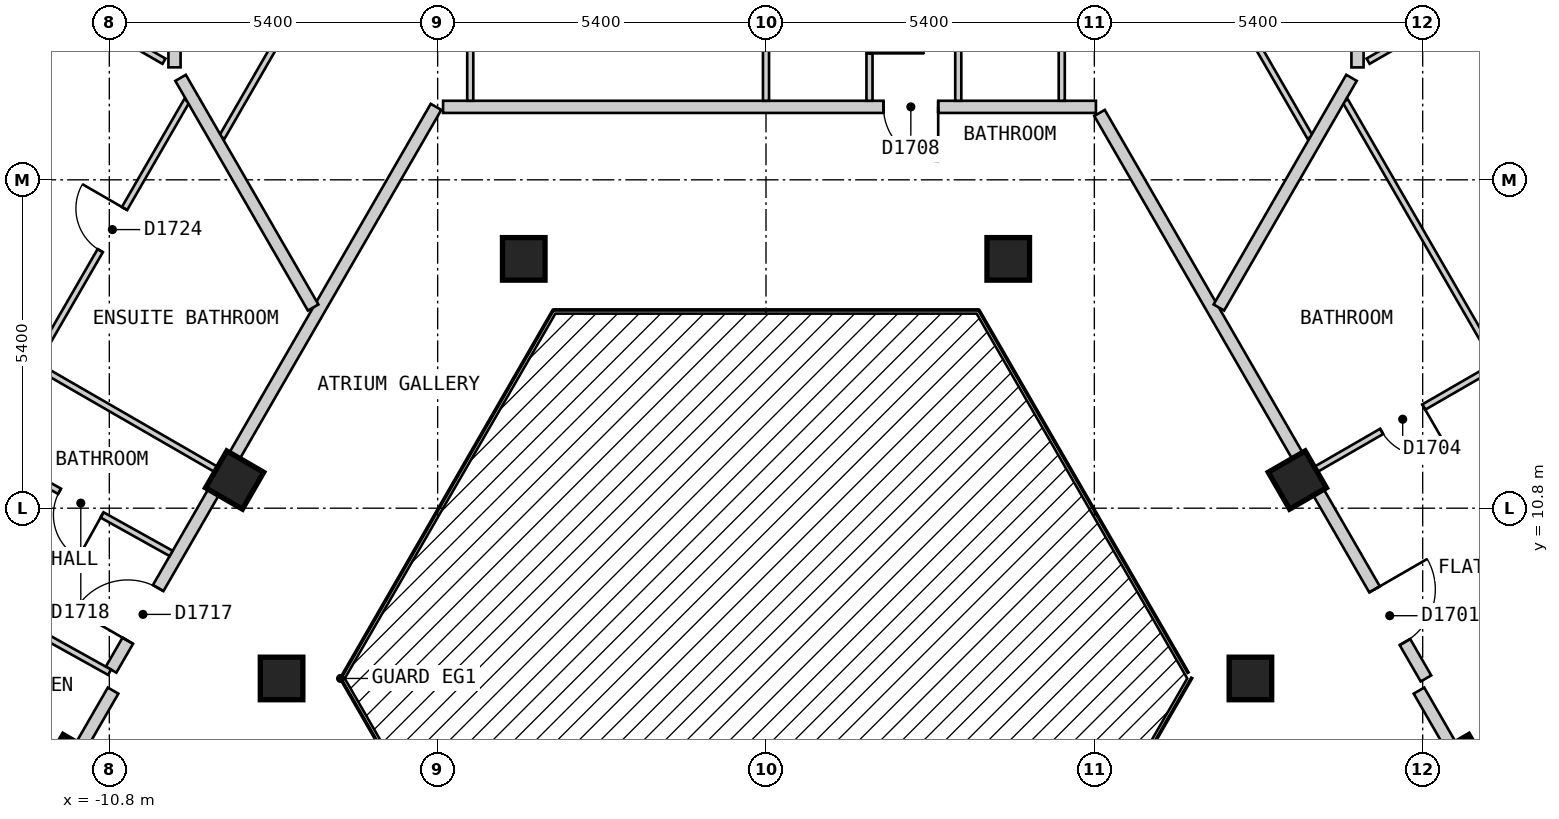
"""IFC4 building model, lengths in metres.
Left out: names, types, materials, properties, quantities, classifications, styles, units other than length and angle.
Written with IfcOpenShell. Run it as: python <this file> out.ifc"""

import sys

from ifc_helpers import new_model, si_unit, direction, frame, frame_2d, origin, origin_2d, place, context, subcontext, project, spatial, rectangle, extrude, element, fill, save


model = new_model("IFC4")
c1 = context("Model", 3, precision=1e-05, world=origin(), true_north=direction((0.0, 1.0)))
c2 = subcontext(c1, "Body", "Model", "MODEL_VIEW")
j1 = project(units=[si_unit("LENGTHUNIT", "METRE"), si_unit("PLANEANGLEUNIT", "RADIAN")], contexts=[c1])
p1 = place(None, origin())
s1 = spatial("IfcSite", under=j1, at=p1, CompositionType="ELEMENT")
p2 = place(p1, origin())
s2 = spatial("IfcBuilding", under=s1, at=p2, CompositionType="ELEMENT")
p3 = place(p2, frame((0.0, 0.0, 181.2)))
s3 = spatial("IfcBuildingStorey", under=s2, at=p3, CompositionType="ELEMENT", Elevation=181.2)
for number, where, z_axis, x_axis in (
    (1, (11.431, 6.6, 0.0), (0.0, 0.0, 1.0), (-0.5, 0.866, 0.0)),
    (2, (7.967, 8.0, 0.0), (0.0, 0.0, 1.0), (1.0, 0.0, 0.0)),
    (3, (8.739, 11.263, 0.0), (0.0, 0.0, 1.0), (-0.5, 0.866, 0.0)),
    (4, (3.984, 14.9, 0.0), (0.0, 0.0, 1.0), (1.0, 0.0, 0.0)),
    (5, (-3.984, 14.9, 0.0), (0.0, 0.0, 1.0), (1.0, 0.0, 0.0)),
    (6, (-8.739, 11.263, 0.0), (0.0, 0.0, 1.0), (-0.5, -0.866, 0.0)),
    (7, (-7.967, 8.0, 0.0), (0.0, 0.0, 1.0), (1.0, 0.0, 0.0)),
    (8, (-11.431, 6.6, 0.0), (0.0, 0.0, 1.0), (-0.5, -0.866, 0.0)),
):
    element("IfcColumn", number, at=place(p3, frame(where, z_axis=z_axis, x_axis=x_axis)), inside=s3, PredefinedType="COLUMN", context=c2, shape_type="SweptSolid", body=[
        extrude(rectangle(XDim=0.7, YDim=0.7, at=origin_2d()), origin(), (0.0, 0.0, 1.0), 3.0),
    ])
p4 = place(p3, frame((10.739, 7.8, 0.0), z_axis=(0.0, 0.0, 1.0), x_axis=(0.500023726918, -0.866011704609, 0.0)))
e9 = element("IfcWall", 9, at=p4, inside=s3, PredefinedType="PARTITIONING", context=c2, shape_type="SweptSolid", body=[
    extrude(rectangle(XDim=9.47, YDim=0.2, at=frame_2d((4.735, 0.0))), origin(), (0.0, 0.0, 1.0), 2.7),
])
p5 = place(p4, frame((8.168, 0.0, 0.0)))
e10 = element("IfcOpeningElement", 10, at=p5, cuts=e9, PredefinedType="OPENING", context=c2, shape_type="SweptSolid", body=[
    extrude(rectangle(XDim=1.0, YDim=2.1, at=frame_2d((0.5, 1.05))), frame((0.0, 0.11, 0.0), z_axis=(0.0, -1.0, 0.0), x_axis=(1.0, 0.0, 0.0)), (0.0, 0.0, 1.0), 0.22),
])
p6 = place(p3, frame((5.485, 17.3, 0.0), z_axis=(0.0, 0.0, 1.0), x_axis=(0.499965832213, -0.866045129667, 0.0)))
e11 = element("IfcWall", 11, at=p6, inside=s3, PredefinedType="PARTITIONING", context=c2, shape_type="SweptSolid", body=[
    extrude(rectangle(XDim=10.739, YDim=0.2, at=frame_2d((5.369, 0.0))), origin(), (0.0, 0.0, 1.0), 2.7),
])
p7 = place(p6, frame((9.047, 0.0, 0.0)))
e12 = element("IfcOpeningElement", 12, at=p7, cuts=e11, PredefinedType="OPENING", context=c2, shape_type="SweptSolid", body=[
    extrude(rectangle(XDim=1.0, YDim=2.1, at=frame_2d((0.5, 1.05))), frame((0.0, 0.11, 0.0), z_axis=(0.0, -1.0, 0.0), x_axis=(1.0, 0.0, 0.0)), (0.0, 0.0, 1.0), 0.22),
])
p8 = place(p3, frame((-5.311, 17.4, 0.0), z_axis=(0.0, 0.0, 1.0), x_axis=(1.0, 0.0, 0.0)))
e13 = element("IfcWall", 13, at=p8, inside=s3, PredefinedType="PARTITIONING", context=c2, shape_type="SweptSolid", body=[
    extrude(rectangle(XDim=10.737, YDim=0.2, at=frame_2d((5.369, 0.0))), origin(), (0.0, 0.0, 1.0), 2.7),
])
p9 = place(p8, frame((7.243, 0.0, 0.0)))
e14 = element("IfcOpeningElement", 14, at=p9, cuts=e13, PredefinedType="OPENING", context=c2, shape_type="SweptSolid", body=[
    extrude(rectangle(XDim=0.9, YDim=2.1, at=frame_2d((0.45, 1.05))), frame((0.0, 0.11, 0.0), z_axis=(0.0, -1.0, 0.0), x_axis=(1.0, 0.0, 0.0)), (0.0, 0.0, 1.0), 0.22),
])
p10 = place(p3, frame((-15.53, -0.501, 0.0), z_axis=(0.0, 0.0, 1.0), x_axis=(0.499952498232, 0.866052827206, 0.0)))
e15 = element("IfcWall", 15, at=p10, inside=s3, PredefinedType="PARTITIONING", context=c2, shape_type="SweptSolid", body=[
    extrude(rectangle(XDim=9.585, YDim=0.2, at=frame_2d((4.792, 0.0))), origin(), (0.0, 0.0, 1.0), 2.7),
])
p11 = place(p10, frame((0.525, 0.0, 0.0)))
e16 = element("IfcOpeningElement", 16, at=p11, cuts=e15, PredefinedType="OPENING", context=c2, shape_type="SweptSolid", body=[
    extrude(rectangle(XDim=1.0, YDim=2.1, at=frame_2d((0.5, 1.05))), frame((0.0, 0.11, 0.0), z_axis=(0.0, -1.0, 0.0), x_axis=(1.0, 0.0, 0.0)), (0.0, 0.0, 1.0), 0.22),
])
p12 = place(p3, frame((-10.771, 8.145, 0.0), z_axis=(0.0, 0.0, 1.0), x_axis=(0.500048075867, 0.865997645391, 0.0)))
e17 = element("IfcWall", 17, at=p12, inside=s3, PredefinedType="PARTITIONING", context=c2, shape_type="SweptSolid", body=[
    extrude(rectangle(XDim=10.687, YDim=0.2, at=frame_2d((5.344, 0.0))), origin(), (0.0, 0.0, 1.0), 2.7),
])
p13 = place(p12, frame((0.549, 0.0, 0.0)))
e18 = element("IfcOpeningElement", 18, at=p13, cuts=e17, PredefinedType="OPENING", context=c2, shape_type="SweptSolid", body=[
    extrude(rectangle(XDim=1.0, YDim=2.1, at=frame_2d((0.5, 1.05))), frame((0.0, 0.11, 0.0), z_axis=(0.0, -1.0, 0.0), x_axis=(1.0, 0.0, 0.0)), (0.0, 0.0, 1.0), 0.22),
])
p14 = place(p3, frame((7.073, 20.15, 0.0), z_axis=(0.0, 0.0, 1.0), x_axis=(0.499917691695, -0.866072919292, 0.0)))
e19 = element("IfcWall", 19, at=p14, inside=s3, PredefinedType="PARTITIONING", context=c2, shape_type="SweptSolid", body=[
    extrude(rectangle(XDim=3.753, YDim=0.1, at=frame_2d((1.876, 0.0))), origin(), (0.0, 0.0, 1.0), 2.7),
])
p15 = place(p14, frame((0.96, 0.0, 0.0)))
e20 = element("IfcOpeningElement", 20, at=p15, cuts=e19, PredefinedType="OPENING", context=c2, shape_type="SweptSolid", body=[
    extrude(rectangle(XDim=0.8, YDim=2.1, at=frame_2d((0.4, 1.05))), frame((0.0, 0.06, 0.0), z_axis=(0.0, -1.0, 0.0), x_axis=(1.0, 0.0, 0.0)), (0.0, 0.0, 1.0), 0.12),
])
p16 = place(p3, frame((9.526, 17.5, 0.0), z_axis=(0.0, 0.0, 1.0), x_axis=(0.500019134094, -0.866014356428, 0.0)))
e21 = element("IfcWall", 21, at=p16, inside=s3, PredefinedType="PARTITIONING", context=c2, shape_type="SweptSolid", body=[
    extrude(rectangle(XDim=10.97, YDim=0.1, at=frame_2d((5.485, 0.0))), origin(), (0.0, 0.0, 1.0), 2.7),
])
p17 = place(p16, frame((7.25, 0.0, 0.0)))
e22 = element("IfcOpeningElement", 22, at=p17, cuts=e21, PredefinedType="OPENING", context=c2, shape_type="SweptSolid", body=[
    extrude(rectangle(XDim=0.9, YDim=2.1, at=frame_2d((0.45, 1.05))), frame((0.0, 0.06, 0.0), z_axis=(0.0, -1.0, 0.0), x_axis=(1.0, 0.0, 0.0)), (0.0, 0.0, 1.0), 0.12),
])
p18 = place(p3, frame((0.0, 20.17, 0.0), z_axis=(0.0, 0.0, 1.0), x_axis=(0.0, -1.0, 0.0)))
e23 = element("IfcWall", 23, at=p18, inside=s3, PredefinedType="PARTITIONING", context=c2, shape_type="SweptSolid", body=[
    extrude(rectangle(XDim=2.67, YDim=0.1, at=frame_2d((1.335, 0.0))), origin(), (0.0, 0.0, 1.0), 2.7),
])
p19 = place(p3, frame((4.864, 20.03, 0.0), z_axis=(0.0, 0.0, 1.0), x_axis=(0.0, -1.0, 0.0)))
e24 = element("IfcWall", 24, at=p19, inside=s3, PredefinedType="PARTITIONING", context=c2, shape_type="SweptSolid", body=[
    extrude(rectangle(XDim=2.53, YDim=0.1, at=frame_2d((1.265, 0.0))), origin(), (0.0, 0.0, 1.0), 2.7),
])
p20 = place(p3, frame((-12.798, 11.735, 0.0), z_axis=(0.0, 0.0, 1.0), x_axis=(0.873649600774, -0.486555623816, 0.0)))
e25 = element("IfcWall", 25, at=p20, inside=s3, PredefinedType="PARTITIONING", context=c2, shape_type="SweptSolid", body=[
    extrude(rectangle(XDim=3.451, YDim=0.1, at=frame_2d((1.726, 0.0))), origin(), (0.0, 0.0, 1.0), 2.7),
])
p21 = place(p20, frame((1.35, 0.0, 0.0)))
e26 = element("IfcOpeningElement", 26, at=p21, cuts=e25, PredefinedType="OPENING", context=c2, shape_type="SweptSolid", body=[
    extrude(rectangle(XDim=0.8, YDim=2.1, at=frame_2d((0.4, 1.05))), frame((0.0, 0.06, 0.0), z_axis=(0.0, -1.0, 0.0), x_axis=(1.0, 0.0, 0.0)), (0.0, 0.0, 1.0), 0.12),
])
p22 = place(p3, frame((-13.898, 9.829, 0.0), z_axis=(0.0, 0.0, 1.0), x_axis=(0.873715787747, -0.486436760784, 0.0)))
e27 = element("IfcWall", 27, at=p22, inside=s3, PredefinedType="PARTITIONING", context=c2, shape_type="SweptSolid", body=[
    extrude(rectangle(XDim=3.55, YDim=0.1, at=frame_2d((1.775, 0.0))), origin(), (0.0, 0.0, 1.0), 2.7),
])
p23 = place(p22, frame((1.3, 0.0, 0.0)))
e28 = element("IfcOpeningElement", 28, at=p23, cuts=e27, PredefinedType="OPENING", context=c2, shape_type="SweptSolid", body=[
    extrude(rectangle(XDim=0.9, YDim=2.1, at=frame_2d((0.45, 1.05))), frame((0.0, 0.06, 0.0), z_axis=(0.0, -1.0, 0.0), x_axis=(1.0, 0.0, 0.0)), (0.0, 0.0, 1.0), 0.12),
])
p24 = place(p3, frame((-14.679, 8.475, 0.0), z_axis=(0.0, 0.0, 1.0), x_axis=(0.865995104784, -0.500052475737, 0.0)))
e29 = element("IfcWall", 29, at=p24, inside=s3, PredefinedType="PARTITIONING", context=c2, shape_type="SweptSolid", body=[
    extrude(rectangle(XDim=3.65, YDim=0.1, at=frame_2d((1.825, 0.0))), origin(), (0.0, 0.0, 1.0), 2.7),
])
p25 = place(p3, frame((-14.794, 20.975, 0.0), z_axis=(0.0, 0.0, 1.0), x_axis=(0.866011447264, -0.500024172624, 0.0)))
e30 = element("IfcWall", 30, at=p25, inside=s3, PredefinedType="PARTITIONING", context=c2, shape_type="SweptSolid", body=[
    extrude(rectangle(XDim=5.65, YDim=0.1, at=frame_2d((2.825, 0.0))), origin(), (0.0, 0.0, 1.0), 2.7),
])
p26 = place(p25, frame((2.475, 0.0, 0.0)))
e31 = element("IfcOpeningElement", 31, at=p26, cuts=e30, PredefinedType="OPENING", context=c2, shape_type="SweptSolid", body=[
    extrude(rectangle(XDim=0.9, YDim=2.1, at=frame_2d((0.45, 1.05))), frame((0.0, 0.06, 0.0), z_axis=(0.0, -1.0, 0.0), x_axis=(1.0, 0.0, 0.0)), (0.0, 0.0, 1.0), 0.12),
])
p27 = place(p3, frame((-8.949, 16.9, 0.0), z_axis=(0.0, 0.0, 1.0), x_axis=(0.499949850951, 0.866054355415, 0.0)))
e32 = element("IfcWall", 32, at=p27, inside=s3, PredefinedType="PARTITIONING", context=c2, shape_type="SweptSolid", body=[
    extrude(rectangle(XDim=3.811, YDim=0.1, at=frame_2d((1.905, 0.0))), origin(), (0.0, 0.0, 1.0), 2.7),
])
p28 = place(p27, frame((1.992, 0.0, 0.0)))
e33 = element("IfcOpeningElement", 33, at=p28, cuts=e32, PredefinedType="OPENING", context=c2, shape_type="SweptSolid", body=[
    extrude(rectangle(XDim=0.8, YDim=2.1, at=frame_2d((0.4, 1.05))), frame((0.0, 0.06, 0.0), z_axis=(0.0, -1.0, 0.0), x_axis=(1.0, 0.0, 0.0)), (0.0, 0.0, 1.0), 0.12),
])
p29 = place(p3, frame((-15.012, 8.0, 0.0), z_axis=(0.0, 0.0, 1.0), x_axis=(0.500047346826, 0.865998066356, 0.0)))
e34 = element("IfcWall", 34, at=p29, inside=s3, PredefinedType="PARTITIONING", context=c2, shape_type="SweptSolid", body=[
    extrude(rectangle(XDim=10.971, YDim=0.1, at=frame_2d((5.486, 0.0))), origin(), (0.0, 0.0, 1.0), 2.7),
])
p30 = place(p29, frame((2.791, 0.0, 0.0)))
e35 = element("IfcOpeningElement", 35, at=p30, cuts=e34, PredefinedType="OPENING", context=c2, shape_type="SweptSolid", body=[
    extrude(rectangle(XDim=0.9, YDim=2.1, at=frame_2d((0.45, 1.05))), frame((0.0, 0.06, 0.0), z_axis=(0.0, -1.0, 0.0), x_axis=(1.0, 0.0, 0.0)), (0.0, 0.0, 1.0), 0.12),
])
p31 = place(p29, frame((8.124, 0.0, 0.0)))
e36 = element("IfcOpeningElement", 36, at=p31, cuts=e34, PredefinedType="OPENING", context=c2, shape_type="SweptSolid", body=[
    extrude(rectangle(XDim=0.8, YDim=2.1, at=frame_2d((0.4, 1.05))), frame((0.0, 0.06, 0.0), z_axis=(0.0, -1.0, 0.0), x_axis=(1.0, 0.0, 0.0)), (0.0, 0.0, 1.0), 0.12),
])
p32 = place(p3, frame((3.162, 17.5, 0.0), z_axis=(0.0, 0.0, 1.0), x_axis=(0.0, 1.0, 0.0)))
e37 = element("IfcWall", 37, at=p32, inside=s3, PredefinedType="PARTITIONING", context=c2, shape_type="SweptSolid", body=[
    extrude(rectangle(XDim=2.51, YDim=0.1, at=frame_2d((1.255, 0.0))), origin(), (0.0, 0.0, 1.0), 2.7),
])
p33 = place(p32, frame((0.83, 0.0, 0.0)))
e38 = element("IfcOpeningElement", 38, at=p33, cuts=e37, PredefinedType="OPENING", context=c2, shape_type="SweptSolid", body=[
    extrude(rectangle(XDim=0.8, YDim=2.1, at=frame_2d((0.4, 1.05))), frame((0.0, 0.06, 0.0), z_axis=(0.0, -1.0, 0.0), x_axis=(1.0, 0.0, 0.0)), (0.0, 0.0, 1.0), 0.12),
])
p34 = place(p3, frame((1.702, 17.5, 0.0), z_axis=(0.0, 0.0, 1.0), x_axis=(0.0, 1.0, 0.0)))
e39 = element("IfcWall", 39, at=p34, inside=s3, PredefinedType="PARTITIONING", context=c2, shape_type="SweptSolid", body=[
    extrude(rectangle(XDim=2.559, YDim=0.1, at=frame_2d((1.28, 0.0))), origin(), (0.0, 0.0, 1.0), 2.7),
])
p35 = place(p34, frame((0.78, 0.0, 0.0)))
e40 = element("IfcOpeningElement", 40, at=p35, cuts=e39, PredefinedType="OPENING", context=c2, shape_type="SweptSolid", body=[
    extrude(rectangle(XDim=0.9, YDim=2.1, at=frame_2d((0.45, 1.05))), frame((0.0, 0.06, 0.0), z_axis=(0.0, -1.0, 0.0), x_axis=(1.0, 0.0, 0.0)), (0.0, 0.0, 1.0), 0.12),
])
p36 = place(p3, frame((-4.864, 17.5, 0.0), z_axis=(0.0, 0.0, 1.0), x_axis=(0.0, 1.0, 0.0)))
e41 = element("IfcWall", 41, at=p36, inside=s3, PredefinedType="PARTITIONING", context=c2, shape_type="SweptSolid", body=[
    extrude(rectangle(XDim=2.7, YDim=0.1, at=frame_2d((1.35, 0.0))), origin(), (0.0, 0.0, 1.0), 2.7),
])
p37 = place(p3, frame((11.518, 6.65, 0.0), z_axis=(0.0, 0.0, 1.0), x_axis=(0.865984470368, 0.500070892056, 0.0)))
e42 = element("IfcWall", 42, at=p37, inside=s3, PredefinedType="PARTITIONING", context=c2, shape_type="SweptSolid", body=[
    extrude(rectangle(XDim=3.7, YDim=0.1, at=frame_2d((1.85, 0.0))), origin(), (0.0, 0.0, 1.0), 2.7),
])
p38 = place(p37, frame((1.35, 0.0, 0.0)))
e43 = element("IfcOpeningElement", 43, at=p38, cuts=e42, PredefinedType="OPENING", context=c2, shape_type="SweptSolid", body=[
    extrude(rectangle(XDim=0.9, YDim=2.1, at=frame_2d((0.45, 1.05))), frame((0.0, 0.06, 0.0), z_axis=(0.0, -1.0, 0.0), x_axis=(1.0, 0.0, 0.0)), (0.0, 0.0, 1.0), 0.12),
])
p39 = place(p3, frame((8.999, 11.413, 0.0), z_axis=(0.0, 0.0, 1.0), x_axis=(0.866019471182, 0.500010275428, 0.0)))
e44 = element("IfcWall", 44, at=p39, inside=s3, PredefinedType="PARTITIONING", context=c2, shape_type="SweptSolid", body=[
    extrude(rectangle(XDim=3.5, YDim=0.1, at=frame_2d((1.75, 0.0))), origin(), (0.0, 0.0, 1.0), 2.7),
])
p40 = place(p39, frame((1.3, 0.0, 0.0)))
e45 = element("IfcOpeningElement", 45, at=p40, cuts=e44, PredefinedType="OPENING", context=c2, shape_type="SweptSolid", body=[
    extrude(rectangle(XDim=0.8, YDim=2.1, at=frame_2d((0.4, 1.05))), frame((0.0, 0.06, 0.0), z_axis=(0.0, -1.0, 0.0), x_axis=(1.0, 0.0, 0.0)), (0.0, 0.0, 1.0), 0.12),
])
p41 = place(p3, frame((9.902, 18.151, 0.0), z_axis=(0.0, 0.0, 1.0), x_axis=(0.866032278734, 0.499988092049, 0.0)))
e46 = element("IfcWall", 46, at=p41, inside=s3, PredefinedType="PARTITIONING", context=c2, shape_type="SweptSolid", body=[
    extrude(rectangle(XDim=5.649, YDim=0.1, at=frame_2d((2.824, 0.0))), origin(), (0.0, 0.0, 1.0), 2.7),
])
p42 = place(p41, frame((2.274, 0.0, 0.0)))
e47 = element("IfcOpeningElement", 47, at=p42, cuts=e46, PredefinedType="OPENING", context=c2, shape_type="SweptSolid", body=[
    extrude(rectangle(XDim=0.9, YDim=2.1, at=frame_2d((0.45, 1.05))), frame((0.0, 0.06, 0.0), z_axis=(0.0, -1.0, 0.0), x_axis=(1.0, 0.0, 0.0)), (0.0, 0.0, 1.0), 0.12),
])
p43 = place(p3, frame((-9.628, 17.877, 0.0), z_axis=(0.0, 0.0, 1.0), x_axis=(0.499890461358, -0.866088636713, 0.0)))
e48 = element("IfcWall", 48, at=p43, inside=s3, PredefinedType="PARTITIONING", context=c2, shape_type="SweptSolid", body=[
    extrude(rectangle(XDim=4.361, YDim=0.2, at=frame_2d((2.18, 0.0))), origin(), (0.0, 0.0, 1.0), 2.7),
])
p44 = place(p3, frame((7.448, 14.1, 0.0), z_axis=(0.0, 0.0, 1.0), x_axis=(0.499961462843, 0.866047652079, 0.0)))
e49 = element("IfcWall", 49, at=p44, inside=s3, PredefinedType="PARTITIONING", context=c2, shape_type="SweptSolid", body=[
    extrude(rectangle(XDim=4.362, YDim=0.2, at=frame_2d((2.181, 0.0))), origin(), (0.0, 0.0, 1.0), 2.7),
])
p45 = place(p3, frame((9.728, 18.049, 0.0), z_axis=(0.0, 0.0, 1.0), x_axis=(0.0, 1.0, 0.0)))
e50 = element("IfcWall", 50, at=p45, inside=s3, PredefinedType="PARTITIONING", context=c2, shape_type="SweptSolid", body=[
    extrude(rectangle(XDim=5.851, YDim=0.2, at=frame_2d((2.925, 0.0))), origin(), (0.0, 0.0, 1.0), 2.7),
])
p46 = place(p3, frame((-9.728, 18.05, 0.0), z_axis=(0.0, 0.0, 1.0), x_axis=(0.0, 1.0, 0.0)))
e51 = element("IfcWall", 51, at=p46, inside=s3, PredefinedType="PARTITIONING", context=c2, shape_type="SweptSolid", body=[
    extrude(rectangle(XDim=5.85, YDim=0.2, at=frame_2d((2.925, 0.0))), origin(), (0.0, 0.0, 1.0), 2.7),
])
p47 = place(p3, frame((-12.031, 13.163, 0.0), z_axis=(0.0, 0.0, 1.0), x_axis=(0.86608920467, -0.499889477339, 0.0)))
e52 = element("IfcWall", 52, at=p47, inside=s3, PredefinedType="PARTITIONING", context=c2, shape_type="SweptSolid", body=[
    extrude(rectangle(XDim=3.501, YDim=0.1, at=frame_2d((1.75, 0.0))), origin(), (0.0, 0.0, 1.0), 2.7),
])
p48 = place(p7, origin())
e53 = element("IfcDoor", 53, at=p48, inside=s3, OperationType="SINGLE_SWING_LEFT", PredefinedType="DOOR", context=c2, shape_type="SweptSolid", body=[
    extrude(rectangle(XDim=1.0, YDim=2.1, at=frame_2d((0.5, 1.05))), frame((0.0, 0.025, 0.0), z_axis=(0.0, -1.0, 0.0), x_axis=(1.0, 0.0, 0.0)), (0.0, 0.0, 1.0), 0.05),
])
fill(e12, e53)
p49 = place(p40, origin())
e54 = element("IfcDoor", 54, at=p49, inside=s3, OperationType="SINGLE_SWING_RIGHT", PredefinedType="DOOR", context=c2, shape_type="SweptSolid", body=[
    extrude(rectangle(XDim=0.8, YDim=2.1, at=frame_2d((0.4, 1.05))), frame((0.0, 0.025, 0.0), z_axis=(0.0, -1.0, 0.0), x_axis=(1.0, 0.0, 0.0)), (0.0, 0.0, 1.0), 0.05),
])
fill(e45, e54)
p50 = place(p9, origin())
e55 = element("IfcDoor", 55, at=p50, inside=s3, OperationType="SINGLE_SWING_RIGHT", PredefinedType="DOOR", context=c2, shape_type="SweptSolid", body=[
    extrude(rectangle(XDim=0.9, YDim=2.1, at=frame_2d((0.45, 1.05))), frame((0.0, 0.025, 0.0), z_axis=(0.0, -1.0, 0.0), x_axis=(1.0, 0.0, 0.0)), (0.0, 0.0, 1.0), 0.05),
])
fill(e14, e55)
p51 = place(p35, origin())
e56 = element("IfcDoor", 56, at=p51, inside=s3, OperationType="SINGLE_SWING_LEFT", PredefinedType="DOOR", context=c2, shape_type="SweptSolid", body=[
    extrude(rectangle(XDim=0.9, YDim=2.1, at=frame_2d((0.45, 1.05))), frame((0.0, 0.025, 0.0), z_axis=(0.0, -1.0, 0.0), x_axis=(1.0, 0.0, 0.0)), (0.0, 0.0, 1.0), 0.05),
])
fill(e40, e56)
p52 = place(p13, origin())
e57 = element("IfcDoor", 57, at=p52, inside=s3, OperationType="SINGLE_SWING_LEFT", PredefinedType="DOOR", context=c2, shape_type="SweptSolid", body=[
    extrude(rectangle(XDim=1.0, YDim=2.1, at=frame_2d((0.5, 1.05))), frame((0.0, 0.025, 0.0), z_axis=(0.0, -1.0, 0.0), x_axis=(1.0, 0.0, 0.0)), (0.0, 0.0, 1.0), 0.05),
])
fill(e18, e57)
p53 = place(p21, origin())
e58 = element("IfcDoor", 58, at=p53, inside=s3, OperationType="SINGLE_SWING_RIGHT", PredefinedType="DOOR", context=c2, shape_type="SweptSolid", body=[
    extrude(rectangle(XDim=0.8, YDim=2.1, at=frame_2d((0.4, 1.05))), frame((0.0, 0.025, 0.0), z_axis=(0.0, -1.0, 0.0), x_axis=(1.0, 0.0, 0.0)), (0.0, 0.0, 1.0), 0.05),
])
fill(e26, e58)
p54 = place(p31, origin())
e59 = element("IfcDoor", 59, at=p54, inside=s3, OperationType="SINGLE_SWING_RIGHT", PredefinedType="DOOR", context=c2, shape_type="SweptSolid", body=[
    extrude(rectangle(XDim=0.8, YDim=2.1, at=frame_2d((0.4, 1.05))), frame((0.0, 0.025, 0.0), z_axis=(0.0, -1.0, 0.0), x_axis=(1.0, 0.0, 0.0)), (0.0, 0.0, 1.0), 0.05),
])
fill(e36, e59)
save(model, sys.argv[1])
